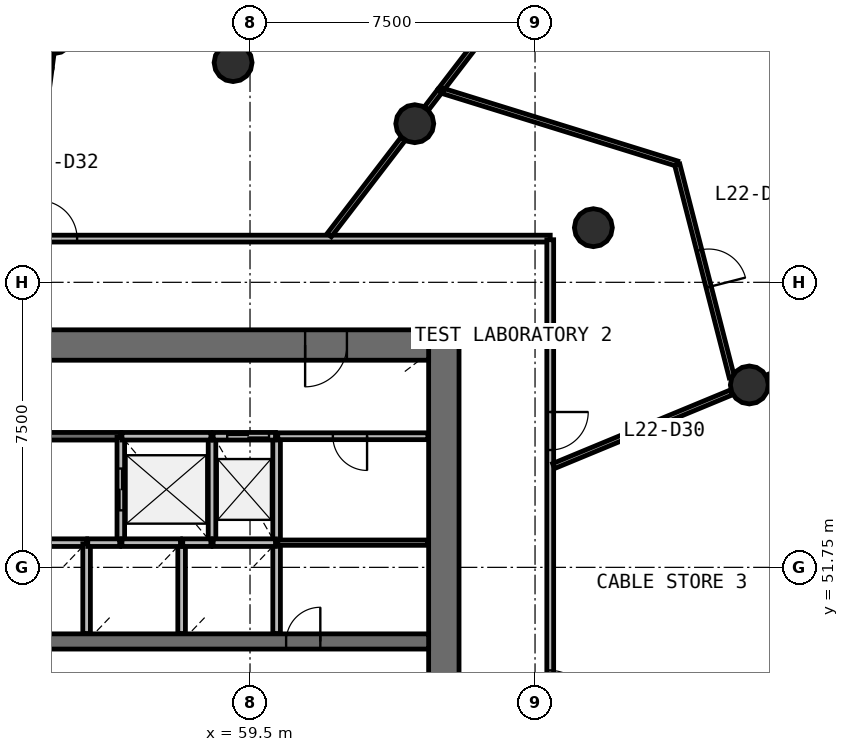
"""IFC4 building model, lengths in metres.
Left out: names, types, materials, properties, quantities, classifications, styles, units other than length and angle.
Written with IfcOpenShell. Run it as: python <this file> out.ifc"""

import sys

from ifc_helpers import new_model, si_unit, direction, frame, frame_2d, origin, origin_2d, place, context, subcontext, project, spatial, rectangle, circle, extrude, source, transform, mapped, element, fill, save


model = new_model("IFC4")
c1 = context("Model", 3, precision=1e-05, world=origin(), true_north=direction((0.0, 1.0)))
c2 = subcontext(c1, "Body", "Model", "MODEL_VIEW")
j1 = project(units=[si_unit("LENGTHUNIT", "METRE"), si_unit("PLANEANGLEUNIT", "RADIAN")], contexts=[c1])
p1 = place(None, origin())
s1 = spatial("IfcSite", under=j1, at=p1, CompositionType="ELEMENT")
p2 = place(p1, origin())
s2 = spatial("IfcBuilding", under=s1, at=p2, CompositionType="ELEMENT")
p3 = place(p2, frame((0.0, 0.0, 96.2)))
s3 = spatial("IfcBuildingStorey", under=s2, at=p3, CompositionType="ELEMENT", Elevation=96.2)
p4 = place(p3, frame((64.6, 38.0, 0.0), z_axis=(0.0, 0.0, 1.0), x_axis=(0.0, 1.0, 0.0)))
e1 = element("IfcWall", 1, at=p4, inside=s3, PredefinedType="SHEAR", context=c2, shape_type="SweptSolid", body=[
    extrude(rectangle(XDim=20.0, YDim=0.8, at=frame_2d((10.0, 0.0))), origin(), (0.0, 0.0, 1.0), 4.1),
])
p5 = place(p4, frame((9.1, 0.0, 0.0)))
e2 = element("IfcOpeningElement", 2, at=p5, cuts=e1, PredefinedType="OPENING", context=c2, shape_type="SweptSolid", body=[
    extrude(rectangle(XDim=1.8, YDim=2.1, at=frame_2d((0.9, 1.05))), frame((0.0, 0.41, 0.0), z_axis=(0.0, -1.0, 0.0), x_axis=(1.0, 0.0, 0.0)), (0.0, 0.0, 1.0), 0.82),
])
p6 = place(p3, frame((64.2, 57.6, 0.0), z_axis=(0.0, 0.0, 1.0), x_axis=(-1.0, 0.0, 0.0)))
e3 = element("IfcWall", 3, at=p6, inside=s3, PredefinedType="SHEAR", context=c2, shape_type="SweptSolid", body=[
    extrude(rectangle(XDim=24.4, YDim=0.8, at=frame_2d((12.2, 0.0))), origin(), (0.0, 0.0, 1.0), 4.1),
])
p7 = place(p6, frame((21.65, 0.0, 0.0)))
e4 = element("IfcOpeningElement", 4, at=p7, cuts=e3, PredefinedType="OPENING", context=c2, shape_type="SweptSolid", body=[
    extrude(rectangle(XDim=1.1, YDim=2.1, at=frame_2d((0.55, 1.05))), frame((0.0, 0.41, 0.0), z_axis=(0.0, -1.0, 0.0), x_axis=(1.0, 0.0, 0.0)), (0.0, 0.0, 1.0), 0.82),
])
p8 = place(p6, frame((2.15, 0.0, 0.0)))
e5 = element("IfcOpeningElement", 5, at=p8, cuts=e3, PredefinedType="OPENING", context=c2, shape_type="SweptSolid", body=[
    extrude(rectangle(XDim=1.1, YDim=2.1, at=frame_2d((0.55, 1.05))), frame((0.0, 0.41, 0.0), z_axis=(0.0, -1.0, 0.0), x_axis=(1.0, 0.0, 0.0)), (0.0, 0.0, 1.0), 0.82),
])
p9 = place(p3, frame((39.8, 49.8, 0.0), z_axis=(0.0, 0.0, 1.0), x_axis=(1.0, 0.0, 0.0)))
e6 = element("IfcWall", 6, at=p9, inside=s3, PredefinedType="SHEAR", context=c2, shape_type="SweptSolid", body=[
    extrude(rectangle(XDim=24.4, YDim=0.4, at=frame_2d((12.2, 0.0))), origin(), (0.0, 0.0, 1.0), 4.1),
])
p10 = place(p9, frame((4.7, 0.0, 0.0)))
e7 = element("IfcOpeningElement", 7, at=p10, cuts=e6, PredefinedType="OPENING", context=c2, shape_type="SweptSolid", body=[
    extrude(rectangle(XDim=1.1, YDim=2.1, at=frame_2d((0.55, 1.05))), frame((0.0, 0.21, 0.0), z_axis=(0.0, -1.0, 0.0), x_axis=(1.0, 0.0, 0.0)), (0.0, 0.0, 1.0), 0.42),
])
p11 = place(p9, frame((7.2, 0.0, 0.0)))
e8 = element("IfcOpeningElement", 8, at=p11, cuts=e6, PredefinedType="OPENING", context=c2, shape_type="SweptSolid", body=[
    extrude(rectangle(XDim=1.1, YDim=2.1, at=frame_2d((0.55, 1.05))), frame((0.0, 0.21, 0.0), z_axis=(0.0, -1.0, 0.0), x_axis=(1.0, 0.0, 0.0)), (0.0, 0.0, 1.0), 0.42),
])
p12 = place(p9, frame((9.7, 0.0, 0.0)))
e9 = element("IfcOpeningElement", 9, at=p12, cuts=e6, PredefinedType="OPENING", context=c2, shape_type="SweptSolid", body=[
    extrude(rectangle(XDim=1.1, YDim=2.1, at=frame_2d((0.55, 1.05))), frame((0.0, 0.21, 0.0), z_axis=(0.0, -1.0, 0.0), x_axis=(1.0, 0.0, 0.0)), (0.0, 0.0, 1.0), 0.42),
])
p13 = place(p9, frame((1.1, 0.0, 0.0)))
e10 = element("IfcOpeningElement", 10, at=p13, cuts=e6, PredefinedType="OPENING", context=c2, shape_type="SweptSolid", body=[
    extrude(rectangle(XDim=1.8, YDim=2.4, at=frame_2d((0.9, 1.2))), frame((0.0, 0.21, 0.0), z_axis=(0.0, -1.0, 0.0), x_axis=(1.0, 0.0, 0.0)), (0.0, 0.0, 1.0), 0.42),
])
p14 = place(p9, frame((20.65, 0.0, 0.0)))
e11 = element("IfcOpeningElement", 11, at=p14, cuts=e6, PredefinedType="OPENING", context=c2, shape_type="SweptSolid", body=[
    extrude(rectangle(XDim=0.9, YDim=2.1, at=frame_2d((0.45, 1.05))), frame((0.0, 0.21, 0.0), z_axis=(0.0, -1.0, 0.0), x_axis=(1.0, 0.0, 0.0)), (0.0, 0.0, 1.0), 0.42),
])
p15 = place(p9, frame((11.85, 0.0, 0.0)))
e12 = element("IfcOpeningElement", 12, at=p15, cuts=e6, PredefinedType="OPENING", context=c2, shape_type="SweptSolid", body=[
    extrude(rectangle(XDim=0.9, YDim=2.1, at=frame_2d((0.45, 1.05))), frame((0.0, 0.21, 0.0), z_axis=(0.0, -1.0, 0.0), x_axis=(1.0, 0.0, 0.0)), (0.0, 0.0, 1.0), 0.42),
])
m1 = source(origin(), c2, "Body", "SweptSolid", [
    extrude(circle(Radius=0.5, at=origin_2d()), origin(), (0.0, 0.0, 1.0), 4.1),
])
for number, where, z_axis, x_axis in (
    (13, (72.639, 56.549, 0.0), (0.0, 0.0, 1.0), (1.0, 0.0, 0.0)),
    (14, (68.535, 60.688, 0.0), (0.0, 0.0, 1.0), (1.0, 0.0, 0.0)),
    (15, (63.835, 63.424, 0.0), (0.0, 0.0, 1.0), (1.0, 0.0, 0.0)),
    (16, (59.055, 65.031, 0.0), (0.0, 0.0, 1.0), (1.0, 0.0, 0.0)),
    (17, (54.339, 65.767, 0.0), (0.0, 0.0, 1.0), (1.0, 0.0, 0.0)),
):
    element("IfcColumn", number, at=place(p3, frame(where, z_axis=z_axis, x_axis=x_axis)), inside=s3, PredefinedType="COLUMN", context=c2, shape_type="MappedRepresentation", body=[
        mapped(m1, transform((0.0, 0.0, 0.0), scale=1.0)),
    ])
p16 = place(p3, frame((56.1, 55.2, 0.0), z_axis=(0.0, 0.0, 1.0), x_axis=(-1.0, 0.0, 0.0)))
e18 = element("IfcWall", 18, at=p16, inside=s3, PredefinedType="SOLIDWALL", context=c2, shape_type="SweptSolid", body=[
    extrude(rectangle(XDim=5.67, YDim=0.2, at=frame_2d((2.835, 0.0))), origin(), (0.0, 0.0, 1.0), 3.7),
])
p17 = place(p16, frame((2.95, 0.0, 0.0)))
e19 = element("IfcOpeningElement", 19, at=p17, cuts=e18, PredefinedType="OPENING", context=c2, shape_type="SweptSolid", body=[
    extrude(rectangle(XDim=1.1, YDim=2.1, at=frame_2d((0.55, 1.05))), frame((0.0, 0.11, 0.0), z_axis=(0.0, -1.0, 0.0), x_axis=(1.0, 0.0, 0.0)), (0.0, 0.0, 1.0), 0.22),
])
p18 = place(p3, frame((56.1, 55.17, 0.0), z_axis=(0.0, 0.0, 1.0), x_axis=(0.0, -1.0, 0.0)))
e20 = element("IfcWall", 20, at=p18, inside=s3, PredefinedType="SOLIDWALL", context=c2, shape_type="SweptSolid", body=[
    extrude(rectangle(XDim=2.77, YDim=0.2, at=frame_2d((1.385, 0.0))), origin(), (0.0, 0.0, 1.0), 3.7),
])
p19 = place(p18, frame((0.82, 0.0, 0.0)))
e21 = element("IfcOpeningElement", 21, at=p19, cuts=e20, PredefinedType="OPENING", context=c2, shape_type="SweptSolid", body=[
    extrude(rectangle(XDim=1.1, YDim=2.1, at=frame_2d((0.55, 1.05))), frame((0.0, 0.11, 0.0), z_axis=(0.0, -1.0, 0.0), x_axis=(1.0, 0.0, 0.0)), (0.0, 0.0, 1.0), 0.22),
])
for number, where, z_axis, x_axis in (
    (22, (58.5, 52.4, 0.0), (0.0, 0.0, 1.0), (0.0, 1.0, 0.0)),
    (23, (60.2, 52.4, 0.0), (0.0, 0.0, 1.0), (0.0, 1.0, 0.0)),
):
    element("IfcWall", number, at=place(p3, frame(where, z_axis=z_axis, x_axis=x_axis)), inside=s3, PredefinedType="SOLIDWALL", context=c2, shape_type="SweptSolid", body=[
        extrude(rectangle(XDim=2.8, YDim=0.2, at=frame_2d((1.4, 0.0))), origin(), (0.0, 0.0, 1.0), 3.7),
    ])
p20 = place(p3, frame((55.2, 52.4, 0.0), z_axis=(0.0, 0.0, 1.0), x_axis=(-1.0, 0.0, 0.0)))
e24 = element("IfcWall", 24, at=p20, inside=s3, PredefinedType="SOLIDWALL", context=c2, shape_type="SweptSolid", body=[
    extrude(rectangle(XDim=2.5, YDim=0.2, at=frame_2d((1.25, 0.0))), origin(), (0.0, 0.0, 1.0), 3.7),
])
p21 = place(p3, frame((58.47, 55.2, 0.0), z_axis=(0.0, 0.0, 1.0), x_axis=(-1.0, 0.0, 0.0)))
e25 = element("IfcWall", 25, at=p21, inside=s3, PredefinedType="SOLIDWALL", context=c2, shape_type="SweptSolid", body=[
    extrude(rectangle(XDim=2.34, YDim=0.2, at=frame_2d((1.17, 0.0))), origin(), (0.0, 0.0, 1.0), 3.7),
])
p22 = place(p3, frame((55.2, 50.01, 0.0), z_axis=(0.0, 0.0, 1.0), x_axis=(0.0, 1.0, 0.0)))
e26 = element("IfcWall", 26, at=p22, inside=s3, PredefinedType="SOLIDWALL", context=c2, shape_type="SweptSolid", body=[
    extrude(rectangle(XDim=2.36, YDim=0.2, at=frame_2d((1.18, 0.0))), origin(), (0.0, 0.0, 1.0), 3.7),
])
p23 = place(p3, frame((57.7, 50.01, 0.0), z_axis=(0.0, 0.0, 1.0), x_axis=(0.0, 1.0, 0.0)))
e27 = element("IfcWall", 27, at=p23, inside=s3, PredefinedType="SOLIDWALL", context=c2, shape_type="SweptSolid", body=[
    extrude(rectangle(XDim=2.39, YDim=0.2, at=frame_2d((1.195, 0.0))), origin(), (0.0, 0.0, 1.0), 3.7),
])
p24 = place(p3, frame((60.2, 50.01, 0.0), z_axis=(0.0, 0.0, 1.0), x_axis=(0.0, 1.0, 0.0)))
e28 = element("IfcWall", 28, at=p24, inside=s3, PredefinedType="SOLIDWALL", context=c2, shape_type="SweptSolid", body=[
    extrude(rectangle(XDim=2.36, YDim=0.2, at=frame_2d((1.18, 0.0))), origin(), (0.0, 0.0, 1.0), 3.7),
])
p25 = place(p3, frame((60.17, 52.4, 0.0), z_axis=(0.0, 0.0, 1.0), x_axis=(-1.0, 0.0, 0.0)))
e29 = element("IfcWall", 29, at=p25, inside=s3, PredefinedType="SOLIDWALL", context=c2, shape_type="SweptSolid", body=[
    extrude(rectangle(XDim=1.64, YDim=0.2, at=frame_2d((0.82, 0.0))), origin(), (0.0, 0.0, 1.0), 3.7),
])
p26 = place(p3, frame((60.17, 55.2, 0.0), z_axis=(0.0, 0.0, 1.0), x_axis=(-1.0, 0.0, 0.0)))
e30 = element("IfcWall", 30, at=p26, inside=s3, PredefinedType="SOLIDWALL", context=c2, shape_type="SweptSolid", body=[
    extrude(rectangle(XDim=1.64, YDim=0.2, at=frame_2d((0.82, 0.0))), origin(), (0.0, 0.0, 1.0), 3.7),
])
p27 = place(p26, frame((0.17, 0.0, 0.0)))
e31 = element("IfcOpeningElement", 31, at=p27, cuts=e30, PredefinedType="OPENING", context=c2, shape_type="SweptSolid", body=[
    extrude(rectangle(XDim=1.1, YDim=2.1, at=frame_2d((0.55, 1.05))), frame((0.0, 0.11, 0.0), z_axis=(0.0, -1.0, 0.0), x_axis=(1.0, 0.0, 0.0)), (0.0, 0.0, 1.0), 0.22),
])
p28 = place(p3, frame((57.67, 52.4, 0.0), z_axis=(0.0, 0.0, 1.0), x_axis=(-1.0, 0.0, 0.0)))
e32 = element("IfcWall", 32, at=p28, inside=s3, PredefinedType="SOLIDWALL", context=c2, shape_type="SweptSolid", body=[
    extrude(rectangle(XDim=1.54, YDim=0.2, at=frame_2d((0.77, 0.0))), origin(), (0.0, 0.0, 1.0), 3.7),
])
p29 = place(p3, frame((56.07, 52.4, 0.0), z_axis=(0.0, 0.0, 1.0), x_axis=(-1.0, 0.0, 0.0)))
e33 = element("IfcWall", 33, at=p29, inside=s3, PredefinedType="SOLIDWALL", context=c2, shape_type="SweptSolid", body=[
    extrude(rectangle(XDim=0.84, YDim=0.2, at=frame_2d((0.42, 0.0))), origin(), (0.0, 0.0, 1.0), 3.7),
])
p30 = place(p3, frame((58.47, 52.4, 0.0), z_axis=(0.0, 0.0, 1.0), x_axis=(-1.0, 0.0, 0.0)))
e34 = element("IfcWall", 34, at=p30, inside=s3, PredefinedType="SOLIDWALL", context=c2, shape_type="SweptSolid", body=[
    extrude(rectangle(XDim=0.74, YDim=0.2, at=frame_2d((0.37, 0.0))), origin(), (0.0, 0.0, 1.0), 3.7),
])
p31 = place(p3, frame((36.6, 60.4, 0.0), z_axis=(0.0, 0.0, 1.0), x_axis=(1.0, 0.0, 0.0)))
e35 = element("IfcWall", 35, at=p31, inside=s3, PredefinedType="PARTITIONING", context=c2, shape_type="SweptSolid", body=[
    extrude(rectangle(XDim=30.8, YDim=0.18, at=frame_2d((15.4, 0.0))), origin(), (0.0, 0.0, 1.0), 2.9),
])
p32 = place(p31, frame((17.35, 0.0, 0.0)))
e36 = element("IfcOpeningElement", 36, at=p32, cuts=e35, PredefinedType="OPENING", context=c2, shape_type="SweptSolid", body=[
    extrude(rectangle(XDim=1.0, YDim=2.1, at=frame_2d((0.5, 1.05))), frame((0.0, 0.1, 0.0), z_axis=(0.0, -1.0, 0.0), x_axis=(1.0, 0.0, 0.0)), (0.0, 0.0, 1.0), 0.2),
])
p33 = place(p31, frame((14.95, 0.0, 0.0)))
e37 = element("IfcOpeningElement", 37, at=p33, cuts=e35, PredefinedType="OPENING", context=c2, shape_type="SweptSolid", body=[
    extrude(rectangle(XDim=1.0, YDim=2.1, at=frame_2d((0.5, 1.05))), frame((0.0, 0.1, 0.0), z_axis=(0.0, -1.0, 0.0), x_axis=(1.0, 0.0, 0.0)), (0.0, 0.0, 1.0), 0.2),
])
p34 = place(p3, frame((67.4, 60.37, 0.0), z_axis=(0.0, 0.0, 1.0), x_axis=(0.0, -1.0, 0.0)))
e38 = element("IfcWall", 38, at=p34, inside=s3, PredefinedType="PARTITIONING", context=c2, shape_type="SweptSolid", body=[
    extrude(rectangle(XDim=23.583, YDim=0.18, at=frame_2d((11.791, 0.0))), origin(), (0.0, 0.0, 1.0), 2.9),
])
p35 = place(p34, frame((11.333, 0.0, 0.0)))
e39 = element("IfcOpeningElement", 39, at=p35, cuts=e38, PredefinedType="OPENING", context=c2, shape_type="SweptSolid", body=[
    extrude(rectangle(XDim=1.0, YDim=2.1, at=frame_2d((0.5, 1.05))), frame((0.0, 0.1, 0.0), z_axis=(0.0, -1.0, 0.0), x_axis=(1.0, 0.0, 0.0)), (0.0, 0.0, 1.0), 0.2),
])
p36 = place(p34, frame((4.532, 0.0, 0.0)))
e40 = element("IfcOpeningElement", 40, at=p36, cuts=e38, PredefinedType="OPENING", context=c2, shape_type="SweptSolid", body=[
    extrude(rectangle(XDim=1.0, YDim=2.1, at=frame_2d((0.5, 1.05))), frame((0.0, 0.1, 0.0), z_axis=(0.0, -1.0, 0.0), x_axis=(1.0, 0.0, 0.0)), (0.0, 0.0, 1.0), 0.2),
])
p37 = place(p3, frame((64.18, 55.2, 0.0), z_axis=(0.0, 0.0, 1.0), x_axis=(-1.0, 0.0, 0.0)))
e41 = element("IfcWall", 41, at=p37, inside=s3, PredefinedType="PARTITIONING", context=c2, shape_type="SweptSolid", body=[
    extrude(rectangle(XDim=3.95, YDim=0.18, at=frame_2d((1.975, 0.0))), origin(), (0.0, 0.0, 1.0), 3.7),
])
p38 = place(p37, frame((1.6, 0.0, 0.0)))
e42 = element("IfcOpeningElement", 42, at=p38, cuts=e41, PredefinedType="OPENING", context=c2, shape_type="SweptSolid", body=[
    extrude(rectangle(XDim=0.9, YDim=2.1, at=frame_2d((0.45, 1.05))), frame((0.0, 0.1, 0.0), z_axis=(0.0, -1.0, 0.0), x_axis=(1.0, 0.0, 0.0)), (0.0, 0.0, 1.0), 0.2),
])
p39 = place(p3, frame((64.511, 64.305, 0.0), z_axis=(0.0, 0.0, 1.0), x_axis=(0.608747408716, 0.793364098244, 0.0)))
e43 = element("IfcWall", 43, at=p39, inside=s3, PredefinedType="PARTITIONING", context=c2, shape_type="SweptSolid", body=[
    extrude(rectangle(XDim=7.009, YDim=0.14, at=frame_2d((3.504, 0.0))), origin(), (0.0, 0.0, 1.0), 2.9),
])
p40 = place(p3, frame((70.735, 62.375, 0.0), z_axis=(0.0, 0.0, 1.0), x_axis=(-0.955154002862, 0.296109491264, 0.0)))
e44 = element("IfcWall", 44, at=p40, inside=s3, PredefinedType="PARTITIONING", context=c2, shape_type="SweptSolid", body=[
    extrude(rectangle(XDim=6.441, YDim=0.14, at=frame_2d((3.22, 0.0))), origin(), (0.0, 0.0, 1.0), 2.9),
])
p41 = place(p3, frame((70.742, 62.346, 0.0), z_axis=(0.0, 0.0, 1.0), x_axis=(0.248578766965, -0.968611685153, 0.0)))
e45 = element("IfcWall", 45, at=p41, inside=s3, PredefinedType="PARTITIONING", context=c2, shape_type="SweptSolid", body=[
    extrude(rectangle(XDim=5.775, YDim=0.14, at=frame_2d((2.887, 0.0))), origin(), (0.0, 0.0, 1.0), 2.9),
])
p42 = place(p41, frame((2.325, 0.0, 0.0)))
e46 = element("IfcOpeningElement", 46, at=p42, cuts=e45, PredefinedType="OPENING", context=c2, shape_type="SweptSolid", body=[
    extrude(rectangle(XDim=1.0, YDim=2.1, at=frame_2d((0.5, 1.05))), frame((0.0, 0.08, 0.0), z_axis=(0.0, -1.0, 0.0), x_axis=(1.0, 0.0, 0.0)), (0.0, 0.0, 1.0), 0.16),
])
p43 = place(p3, frame((73.194, 45.21, 0.0), z_axis=(0.0, 0.0, 1.0), x_axis=(0.134605146381, 0.99089931606, 0.0)))
e47 = element("IfcWall", 47, at=p43, inside=s3, PredefinedType="PARTITIONING", context=c2, shape_type="SweptSolid", body=[
    extrude(rectangle(XDim=5.704, YDim=0.14, at=frame_2d((2.852, 0.0))), origin(), (0.0, 0.0, 1.0), 2.9),
])
p44 = place(p3, frame((67.49, 54.416, 0.0), z_axis=(0.0, 0.0, 1.0), x_axis=(0.923890025086, 0.382658100067, 0.0)))
e48 = element("IfcWall", 48, at=p44, inside=s3, PredefinedType="PARTITIONING", context=c2, shape_type="SweptSolid", body=[
    extrude(rectangle(XDim=5.068, YDim=0.14, at=frame_2d((2.534, 0.0))), origin(), (0.0, 0.0, 1.0), 2.9),
])
p45 = place(p3, frame((64.18, 52.4, 0.0), z_axis=(0.0, 0.0, 1.0), x_axis=(-1.0, 0.0, 0.0)))
e49 = element("IfcWall", 49, at=p45, inside=s3, PredefinedType="PARTITIONING", context=c2, shape_type="SweptSolid", body=[
    extrude(rectangle(XDim=3.95, YDim=0.14, at=frame_2d((1.975, 0.0))), origin(), (0.0, 0.0, 1.0), 2.9),
])
p46 = place(p3, frame((61.584, 60.49, 0.0), z_axis=(0.0, 0.0, 1.0), x_axis=(0.60874605662, 0.793365135703, 0.0)))
e50 = element("IfcWall", 50, at=p46, inside=s3, PredefinedType="PARTITIONING", context=c2, shape_type="SweptSolid", body=[
    extrude(rectangle(XDim=3.194, YDim=0.14, at=frame_2d((1.597, 0.0))), origin(), (0.0, 0.0, 1.0), 2.9),
])
p47 = place(p3, frame((64.142, 63.824, 0.0), z_axis=(0.0, 0.0, 1.0), x_axis=(0.608911807211, 0.793237928392, 0.0)))
e51 = element("IfcWall", 51, at=p47, inside=s3, PredefinedType="PARTITIONING", context=c2, shape_type="SweptSolid", body=[
    extrude(rectangle(XDim=0.576, YDim=0.14, at=frame_2d((0.288, 0.0))), origin(), (0.0, 0.0, 1.0), 2.9),
])
p48 = place(p3, frame((54.226, 64.909, 0.0), z_axis=(0.0, 0.0, 1.0), x_axis=(0.130349686634, 0.991468082792, 0.0)))
e52 = element("IfcWall", 52, at=p48, inside=s3, PredefinedType="PARTITIONING", context=c2, shape_type="SweptSolid", body=[
    extrude(rectangle(XDim=0.362, YDim=0.14, at=frame_2d((0.181, 0.0))), origin(), (0.0, 0.0, 1.0), 2.9),
])
p49 = place(p3, frame((73.106, 56.742, 0.0), z_axis=(0.0, 0.0, 1.0), x_axis=(0.923646914224, 0.383244540529, 0.0)))
e53 = element("IfcWall", 53, at=p49, inside=s3, PredefinedType="PARTITIONING", context=c2, shape_type="SweptSolid", body=[
    extrude(rectangle(XDim=0.354, YDim=0.14, at=frame_2d((0.177, 0.0))), origin(), (0.0, 0.0, 1.0), 2.9),
])
m2 = source(origin(), c2, "Body", "SweptSolid", [
    extrude(rectangle(XDim=1.1, YDim=2.1, at=frame_2d((0.55, 1.05))), frame((0.0, 0.025, 0.0), z_axis=(0.0, -1.0, 0.0), x_axis=(1.0, 0.0, 0.0)), (0.0, 0.0, 1.0), 0.05),
])
p50 = place(p19, origin())
e54 = element("IfcDoor", 54, at=p50, inside=s3, OperationType="DOUBLE_DOOR_SLIDING", PredefinedType="USERDEFINED", context=c2, shape_type="MappedRepresentation", body=[
    mapped(m2, transform((0.0, 0.0, 0.0), scale=1.0)),
])
fill(e21, e54)
p51 = place(p27, origin())
e55 = element("IfcDoor", 55, at=p51, inside=s3, OperationType="DOUBLE_DOOR_SLIDING", PredefinedType="USERDEFINED", context=c2, shape_type="MappedRepresentation", body=[
    mapped(m2, transform((0.0, 0.0, 0.0), scale=1.0)),
])
fill(e31, e55)
m3 = source(origin(), c2, "Body", "SweptSolid", [
    extrude(rectangle(XDim=1.1, YDim=2.1, at=frame_2d((0.55, 1.05))), frame((0.0, 0.025, 0.0), z_axis=(0.0, -1.0, 0.0), x_axis=(1.0, 0.0, 0.0)), (0.0, 0.0, 1.0), 0.05),
])
p52 = place(p8, origin())
e56 = element("IfcDoor", 56, at=p52, inside=s3, OperationType="SINGLE_SWING_RIGHT", PredefinedType="DOOR", context=c2, shape_type="MappedRepresentation", body=[
    mapped(m3, transform((0.0, 0.0, 0.0), scale=1.0)),
])
fill(e5, e56)
m4 = source(origin(), c2, "Body", "SweptSolid", [
    extrude(rectangle(XDim=1.0, YDim=2.1, at=frame_2d((0.5, 1.05))), frame((0.0, 0.025, 0.0), z_axis=(0.0, -1.0, 0.0), x_axis=(1.0, 0.0, 0.0)), (0.0, 0.0, 1.0), 0.05),
])
p53 = place(p35, origin())
e57 = element("IfcDoor", 57, at=p53, inside=s3, OperationType="SINGLE_SWING_RIGHT", PredefinedType="DOOR", context=c2, shape_type="MappedRepresentation", body=[
    mapped(m4, transform((0.0, 0.0, 0.0), scale=1.0)),
])
fill(e39, e57)
p54 = place(p36, origin())
e58 = element("IfcDoor", 58, at=p54, inside=s3, OperationType="SINGLE_SWING_LEFT", PredefinedType="DOOR", context=c2, shape_type="MappedRepresentation", body=[
    mapped(m4, transform((0.0, 0.0, 0.0), scale=1.0)),
])
fill(e40, e58)
p55 = place(p42, origin())
e59 = element("IfcDoor", 59, at=p55, inside=s3, OperationType="SINGLE_SWING_RIGHT", PredefinedType="DOOR", context=c2, shape_type="MappedRepresentation", body=[
    mapped(m4, transform((0.0, 0.0, 0.0), scale=1.0)),
])
fill(e46, e59)
p56 = place(p32, origin())
e60 = element("IfcDoor", 60, at=p56, inside=s3, OperationType="SINGLE_SWING_LEFT", PredefinedType="DOOR", context=c2, shape_type="MappedRepresentation", body=[
    mapped(m4, transform((0.0, 0.0, 0.0), scale=1.0)),
])
fill(e36, e60)
m5 = source(origin(), c2, "Body", "SweptSolid", [
    extrude(rectangle(XDim=0.9, YDim=2.1, at=frame_2d((0.45, 1.05))), frame((0.0, 0.025, 0.0), z_axis=(0.0, -1.0, 0.0), x_axis=(1.0, 0.0, 0.0)), (0.0, 0.0, 1.0), 0.05),
])
p57 = place(p14, origin())
e61 = element("IfcDoor", 61, at=p57, inside=s3, OperationType="SINGLE_SWING_RIGHT", PredefinedType="DOOR", context=c2, shape_type="MappedRepresentation", body=[
    mapped(m5, transform((0.0, 0.0, 0.0), scale=1.0)),
])
fill(e11, e61)
p58 = place(p38, origin())
e62 = element("IfcDoor", 62, at=p58, inside=s3, OperationType="SINGLE_SWING_LEFT", PredefinedType="DOOR", context=c2, shape_type="MappedRepresentation", body=[
    mapped(m5, transform((0.0, 0.0, 0.0), scale=1.0)),
])
fill(e42, e62)
save(model, sys.argv[1])
